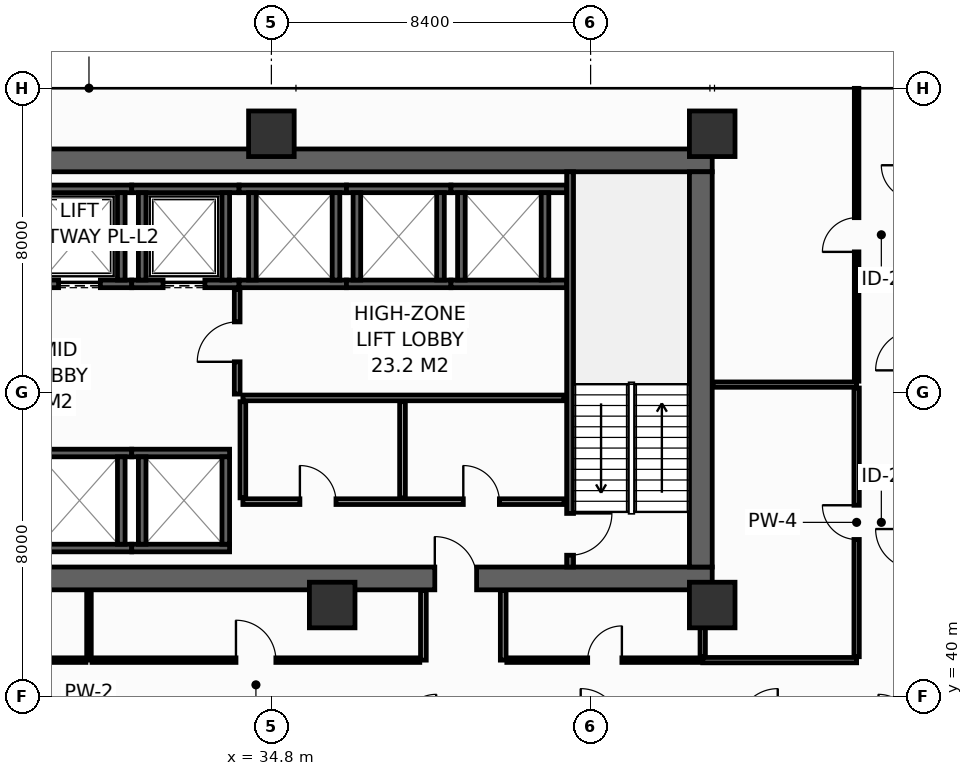
"""IFC4 building model, lengths in metres.
Left out: names, types, materials, properties, quantities, classifications, styles, units other than length and angle.
Written with IfcOpenShell. Run it as: python <this file> out.ifc"""

import sys

from ifc_helpers import new_model, si_unit, direction, frame, frame_2d, origin, origin_2d, place, context, subcontext, project, spatial, rectangle, hollow_rectangle, extrude, element, fill, save


model = new_model("IFC4")
c1 = context("Model", 3, precision=1e-05, world=origin(), true_north=direction((0.0, 1.0)))
c2 = subcontext(c1, "Body", "Model", "MODEL_VIEW")
j1 = project(units=[si_unit("LENGTHUNIT", "METRE"), si_unit("PLANEANGLEUNIT", "RADIAN")], contexts=[c1])
p1 = place(None, origin())
s1 = spatial("IfcSite", under=j1, at=p1, CompositionType="ELEMENT")
p2 = place(p1, origin())
s2 = spatial("IfcBuilding", under=s1, at=p2, CompositionType="ELEMENT")
p3 = place(p2, frame((0.0, 0.0, 92.8)))
s3 = spatial("IfcBuildingStorey", under=s2, at=p3, CompositionType="ELEMENT", Elevation=92.8)
p4 = place(p3, frame((13.5, 43.1, 0.0), z_axis=(0.0, 0.0, 1.0), x_axis=(1.0, 0.0, 0.0)))
e1 = element("IfcWall", 1, at=p4, inside=s3, PredefinedType="SHEAR", context=c2, shape_type="SweptSolid", body=[
    extrude(rectangle(XDim=32.9, YDim=0.6, at=frame_2d((16.45, 0.0))), origin(), (0.0, 0.0, 1.0), 4.15),
])
p5 = place(p4, frame((5.4, 0.0, 0.0)))
e2 = element("IfcOpeningElement", 2, at=p5, cuts=e1, PredefinedType="OPENING", context=c2, shape_type="SweptSolid", body=[
    extrude(rectangle(XDim=1.1, YDim=2.15, at=frame_2d((0.55, 1.075))), frame((0.0, 0.31, 0.0), z_axis=(0.0, -1.0, 0.0), x_axis=(1.0, 0.0, 0.0)), (0.0, 0.0, 1.0), 0.62),
])
p6 = place(p4, frame((25.6, 0.0, 0.0)))
e3 = element("IfcOpeningElement", 3, at=p6, cuts=e1, PredefinedType="OPENING", context=c2, shape_type="SweptSolid", body=[
    extrude(rectangle(XDim=1.1, YDim=2.15, at=frame_2d((0.55, 1.075))), frame((0.0, 0.31, 0.0), z_axis=(0.0, -1.0, 0.0), x_axis=(1.0, 0.0, 0.0)), (0.0, 0.0, 1.0), 0.62),
])
p7 = place(p3, frame((13.5, 54.1, 0.0), z_axis=(0.0, 0.0, 1.0), x_axis=(1.0, 0.0, 0.0)))
e4 = element("IfcWall", 4, at=p7, inside=s3, PredefinedType="SHEAR", context=c2, shape_type="SweptSolid", body=[
    extrude(rectangle(XDim=32.9, YDim=0.6, at=frame_2d((16.45, 0.0))), origin(), (0.0, 0.0, 1.0), 4.15),
])
p8 = place(p3, frame((46.1, 43.4, 0.0), z_axis=(0.0, 0.0, 1.0), x_axis=(0.0, 1.0, 0.0)))
e5 = element("IfcWall", 5, at=p8, inside=s3, PredefinedType="SHEAR", context=c2, shape_type="SweptSolid", body=[
    extrude(rectangle(XDim=10.4, YDim=0.6, at=frame_2d((5.2, 0.0))), origin(), (0.0, 0.0, 1.0), 4.15),
])
for number, where, z_axis, x_axis in (
    (6, (34.8, 54.8, 0.0), (0.0, 0.0, 1.0), (1.0, 0.0, 0.0)),
    (7, (46.4, 54.8, 0.0), (0.0, 0.0, 1.0), (1.0, 0.0, 0.0)),
    (8, (36.4, 42.4, 0.0), (0.0, 0.0, 1.0), (1.0, 0.0, 0.0)),
    (9, (46.4, 42.4, 0.0), (0.0, 0.0, 1.0), (1.0, 0.0, 0.0)),
):
    element("IfcColumn", number, at=place(p3, frame(where, z_axis=z_axis, x_axis=x_axis)), inside=s3, PredefinedType="COLUMN", context=c2, shape_type="SweptSolid", body=[
        extrude(hollow_rectangle(XDim=1.2, YDim=1.2, WallThickness=0.055, at=origin_2d()), origin(), (0.0, 0.0, 1.0), 4.4),
    ])
p9 = place(p3, frame((28.375, 50.85, 0.0), z_axis=(0.0, 0.0, 1.0), x_axis=(1.0, 0.0, 0.0)))
e10 = element("IfcWall", 10, at=p9, inside=s3, PredefinedType="SHEAR", context=c2, shape_type="SweptSolid", body=[
    extrude(rectangle(XDim=2.75, YDim=0.2, at=frame_2d((1.375, 0.0))), origin(), (0.0, 0.0, 1.0), 4.15),
])
p10 = place(p9, frame((0.825, 0.0, 0.0)))
e11 = element("IfcOpeningElement", 11, at=p10, cuts=e10, PredefinedType="OPENING", context=c2, shape_type="SweptSolid", body=[
    extrude(rectangle(XDim=1.1, YDim=2.2, at=frame_2d((0.55, 1.1))), frame((0.0, 0.11, 0.0), z_axis=(0.0, -1.0, 0.0), x_axis=(1.0, 0.0, 0.0)), (0.0, 0.0, 1.0), 0.22),
])
p11 = place(p3, frame((28.375, 53.35, 0.0), z_axis=(0.0, 0.0, 1.0), x_axis=(1.0, 0.0, 0.0)))
e12 = element("IfcWall", 12, at=p11, inside=s3, PredefinedType="SHEAR", context=c2, shape_type="SweptSolid", body=[
    extrude(rectangle(XDim=2.75, YDim=0.2, at=frame_2d((1.375, 0.0))), origin(), (0.0, 0.0, 1.0), 4.15),
])
p12 = place(p3, frame((30.85, 50.95, 0.0), z_axis=(0.0, 0.0, 1.0), x_axis=(0.0, 1.0, 0.0)))
e13 = element("IfcWall", 13, at=p12, inside=s3, PredefinedType="SHEAR", context=c2, shape_type="SweptSolid", body=[
    extrude(rectangle(XDim=2.3, YDim=0.2, at=frame_2d((1.15, 0.0))), origin(), (0.0, 0.0, 1.0), 4.15),
])
p13 = place(p3, frame((31.125, 50.85, 0.0), z_axis=(0.0, 0.0, 1.0), x_axis=(1.0, 0.0, 0.0)))
e14 = element("IfcWall", 14, at=p13, inside=s3, PredefinedType="SHEAR", context=c2, shape_type="SweptSolid", body=[
    extrude(rectangle(XDim=2.825, YDim=0.2, at=frame_2d((1.413, 0.0))), origin(), (0.0, 0.0, 1.0), 4.15),
])
p14 = place(p13, frame((0.825, 0.0, 0.0)))
e15 = element("IfcOpeningElement", 15, at=p14, cuts=e14, PredefinedType="OPENING", context=c2, shape_type="SweptSolid", body=[
    extrude(rectangle(XDim=1.1, YDim=2.2, at=frame_2d((0.55, 1.1))), frame((0.0, 0.11, 0.0), z_axis=(0.0, -1.0, 0.0), x_axis=(1.0, 0.0, 0.0)), (0.0, 0.0, 1.0), 0.22),
])
p15 = place(p3, frame((31.125, 53.35, 0.0), z_axis=(0.0, 0.0, 1.0), x_axis=(1.0, 0.0, 0.0)))
e16 = element("IfcWall", 16, at=p15, inside=s3, PredefinedType="SHEAR", context=c2, shape_type="SweptSolid", body=[
    extrude(rectangle(XDim=2.825, YDim=0.2, at=frame_2d((1.413, 0.0))), origin(), (0.0, 0.0, 1.0), 4.15),
])
for number, where, z_axis, x_axis in (
    (17, (31.4, 50.95, 0.0), (0.0, 0.0, 1.0), (0.0, 1.0, 0.0)),
    (18, (33.6, 50.95, 0.0), (0.0, 0.0, 1.0), (0.0, 1.0, 0.0)),
):
    element("IfcWall", number, at=place(p3, frame(where, z_axis=z_axis, x_axis=x_axis)), inside=s3, PredefinedType="SHEAR", context=c2, shape_type="SweptSolid", body=[
        extrude(rectangle(XDim=2.3, YDim=0.2, at=frame_2d((1.15, 0.0))), origin(), (0.0, 0.0, 1.0), 4.15),
    ])
for number, where, z_axis, x_axis in (
    (19, (28.375, 43.9, 0.0), (0.0, 0.0, 1.0), (1.0, 0.0, 0.0)),
    (20, (28.375, 46.4, 0.0), (0.0, 0.0, 1.0), (1.0, 0.0, 0.0)),
):
    element("IfcWall", number, at=place(p3, frame(where, z_axis=z_axis, x_axis=x_axis)), inside=s3, PredefinedType="SHEAR", context=c2, shape_type="SweptSolid", body=[
        extrude(rectangle(XDim=2.75, YDim=0.2, at=frame_2d((1.375, 0.0))), origin(), (0.0, 0.0, 1.0), 4.15),
    ])
p16 = place(p3, frame((30.85, 44.0, 0.0), z_axis=(0.0, 0.0, 1.0), x_axis=(0.0, 1.0, 0.0)))
e21 = element("IfcWall", 21, at=p16, inside=s3, PredefinedType="SHEAR", context=c2, shape_type="SweptSolid", body=[
    extrude(rectangle(XDim=2.3, YDim=0.2, at=frame_2d((1.15, 0.0))), origin(), (0.0, 0.0, 1.0), 4.15),
])
for number, where, z_axis, x_axis in (
    (22, (31.125, 43.9, 0.0), (0.0, 0.0, 1.0), (1.0, 0.0, 0.0)),
    (23, (31.125, 46.4, 0.0), (0.0, 0.0, 1.0), (1.0, 0.0, 0.0)),
):
    element("IfcWall", number, at=place(p3, frame(where, z_axis=z_axis, x_axis=x_axis)), inside=s3, PredefinedType="SHEAR", context=c2, shape_type="SweptSolid", body=[
        extrude(rectangle(XDim=2.575, YDim=0.2, at=frame_2d((1.288, 0.0))), origin(), (0.0, 0.0, 1.0), 4.15),
    ])
for number, where, z_axis, x_axis in (
    (24, (31.4, 44.0, 0.0), (0.0, 0.0, 1.0), (0.0, 1.0, 0.0)),
    (25, (33.6, 44.0, 0.0), (0.0, 0.0, 1.0), (0.0, 1.0, 0.0)),
):
    element("IfcWall", number, at=place(p3, frame(where, z_axis=z_axis, x_axis=x_axis)), inside=s3, PredefinedType="SHEAR", context=c2, shape_type="SweptSolid", body=[
        extrude(rectangle(XDim=2.3, YDim=0.2, at=frame_2d((1.15, 0.0))), origin(), (0.0, 0.0, 1.0), 4.15),
    ])
for number, where, z_axis, x_axis in (
    (26, (33.95, 50.85, 0.0), (0.0, 0.0, 1.0), (1.0, 0.0, 0.0)),
    (27, (33.95, 53.35, 0.0), (0.0, 0.0, 1.0), (1.0, 0.0, 0.0)),
):
    element("IfcWall", number, at=place(p3, frame(where, z_axis=z_axis, x_axis=x_axis)), inside=s3, PredefinedType="SHEAR", context=c2, shape_type="SweptSolid", body=[
        extrude(rectangle(XDim=2.825, YDim=0.2, at=frame_2d((1.413, 0.0))), origin(), (0.0, 0.0, 1.0), 4.15),
    ])
for number, where, z_axis, x_axis in (
    (28, (34.3, 50.95, 0.0), (0.0, 0.0, 1.0), (0.0, 1.0, 0.0)),
    (29, (36.5, 50.95, 0.0), (0.0, 0.0, 1.0), (0.0, 1.0, 0.0)),
):
    element("IfcWall", number, at=place(p3, frame(where, z_axis=z_axis, x_axis=x_axis)), inside=s3, PredefinedType="SHEAR", context=c2, shape_type="SweptSolid", body=[
        extrude(rectangle(XDim=2.3, YDim=0.2, at=frame_2d((1.15, 0.0))), origin(), (0.0, 0.0, 1.0), 4.15),
    ])
for number, where, z_axis, x_axis in (
    (30, (36.775, 50.85, 0.0), (0.0, 0.0, 1.0), (1.0, 0.0, 0.0)),
    (31, (36.775, 53.35, 0.0), (0.0, 0.0, 1.0), (1.0, 0.0, 0.0)),
):
    element("IfcWall", number, at=place(p3, frame(where, z_axis=z_axis, x_axis=x_axis)), inside=s3, PredefinedType="SHEAR", context=c2, shape_type="SweptSolid", body=[
        extrude(rectangle(XDim=2.75, YDim=0.2, at=frame_2d((1.375, 0.0))), origin(), (0.0, 0.0, 1.0), 4.15),
    ])
for number, where, z_axis, x_axis in (
    (32, (37.05, 50.95, 0.0), (0.0, 0.0, 1.0), (0.0, 1.0, 0.0)),
    (33, (39.25, 50.95, 0.0), (0.0, 0.0, 1.0), (0.0, 1.0, 0.0)),
):
    element("IfcWall", number, at=place(p3, frame(where, z_axis=z_axis, x_axis=x_axis)), inside=s3, PredefinedType="SHEAR", context=c2, shape_type="SweptSolid", body=[
        extrude(rectangle(XDim=2.3, YDim=0.2, at=frame_2d((1.15, 0.0))), origin(), (0.0, 0.0, 1.0), 4.15),
    ])
for number, where, z_axis, x_axis in (
    (34, (39.525, 50.85, 0.0), (0.0, 0.0, 1.0), (1.0, 0.0, 0.0)),
    (35, (39.525, 53.35, 0.0), (0.0, 0.0, 1.0), (1.0, 0.0, 0.0)),
):
    element("IfcWall", number, at=place(p3, frame(where, z_axis=z_axis, x_axis=x_axis)), inside=s3, PredefinedType="SHEAR", context=c2, shape_type="SweptSolid", body=[
        extrude(rectangle(XDim=3.045, YDim=0.2, at=frame_2d((1.522, 0.0))), origin(), (0.0, 0.0, 1.0), 4.15),
    ])
for number, where, z_axis, x_axis in (
    (36, (39.8, 50.95, 0.0), (0.0, 0.0, 1.0), (0.0, 1.0, 0.0)),
    (37, (42.0, 50.95, 0.0), (0.0, 0.0, 1.0), (0.0, 1.0, 0.0)),
):
    element("IfcWall", number, at=place(p3, frame(where, z_axis=z_axis, x_axis=x_axis)), inside=s3, PredefinedType="SHEAR", context=c2, shape_type="SweptSolid", body=[
        extrude(rectangle(XDim=2.3, YDim=0.2, at=frame_2d((1.15, 0.0))), origin(), (0.0, 0.0, 1.0), 4.15),
    ])
p17 = place(p3, frame((42.66, 53.8, 0.0), z_axis=(0.0, 0.0, 1.0), x_axis=(0.0, -1.0, 0.0)))
e38 = element("IfcWall", 38, at=p17, inside=s3, PredefinedType="SHEAR", context=c2, shape_type="SweptSolid", body=[
    extrude(rectangle(XDim=10.4, YDim=0.18, at=frame_2d((5.2, 0.0))), origin(), (0.0, 0.0, 1.0), 4.15),
])
p18 = place(p17, frame((8.99, 0.0, 0.0)))
e39 = element("IfcOpeningElement", 39, at=p18, cuts=e38, PredefinedType="OPENING", context=c2, shape_type="SweptSolid", body=[
    extrude(rectangle(XDim=1.1, YDim=2.15, at=frame_2d((0.55, 1.075))), frame((0.0, 0.1, 0.0), z_axis=(0.0, -1.0, 0.0), x_axis=(1.0, 0.0, 0.0)), (0.0, 0.0, 1.0), 0.2),
])
p19 = place(p3, frame((33.9, 47.95, 0.0), z_axis=(0.0, 0.0, 1.0), x_axis=(0.0, 1.0, 0.0)))
e40 = element("IfcWall", 40, at=p19, inside=s3, PredefinedType="PARTITIONING", context=c2, shape_type="SweptSolid", body=[
    extrude(rectangle(XDim=2.75, YDim=0.15, at=frame_2d((1.375, 0.0))), origin(), (0.0, 0.0, 1.0), 4.15),
])
p20 = place(p19, frame((0.85, 0.0, 0.0)))
e41 = element("IfcOpeningElement", 41, at=p20, cuts=e40, PredefinedType="OPENING", context=c2, shape_type="SweptSolid", body=[
    extrude(rectangle(XDim=1.05, YDim=2.15, at=frame_2d((0.525, 1.075))), frame((0.0, 0.085, 0.0), z_axis=(0.0, -1.0, 0.0), x_axis=(1.0, 0.0, 0.0)), (0.0, 0.0, 1.0), 0.17),
])
p21 = place(p3, frame((34.05, 45.12, 0.0), z_axis=(0.0, 0.0, 1.0), x_axis=(1.0, 0.0, 0.0)))
e42 = element("IfcWall", 42, at=p21, inside=s3, PredefinedType="PARTITIONING", context=c2, shape_type="SweptSolid", body=[
    extrude(rectangle(XDim=8.45, YDim=0.15, at=frame_2d((4.225, 0.0))), origin(), (0.0, 0.0, 1.0), 4.15),
])
p22 = place(p21, frame((1.5, 0.0, 0.0)))
e43 = element("IfcOpeningElement", 43, at=p22, cuts=e42, PredefinedType="OPENING", context=c2, shape_type="SweptSolid", body=[
    extrude(rectangle(XDim=0.95, YDim=2.15, at=frame_2d((0.475, 1.075))), frame((0.0, 0.085, 0.0), z_axis=(0.0, -1.0, 0.0), x_axis=(1.0, 0.0, 0.0)), (0.0, 0.0, 1.0), 0.17),
])
p23 = place(p21, frame((5.8, 0.0, 0.0)))
e44 = element("IfcOpeningElement", 44, at=p23, cuts=e42, PredefinedType="OPENING", context=c2, shape_type="SweptSolid", body=[
    extrude(rectangle(XDim=0.95, YDim=2.15, at=frame_2d((0.475, 1.075))), frame((0.0, 0.085, 0.0), z_axis=(0.0, -1.0, 0.0), x_axis=(1.0, 0.0, 0.0)), (0.0, 0.0, 1.0), 0.17),
])
p24 = place(p3, frame((34.05, 47.85, 0.0), z_axis=(0.0, 0.0, 1.0), x_axis=(1.0, 0.0, 0.0)))
e45 = element("IfcWall", 45, at=p24, inside=s3, PredefinedType="PARTITIONING", context=c2, shape_type="SweptSolid", body=[
    extrude(rectangle(XDim=8.45, YDim=0.15, at=frame_2d((4.225, 0.0))), origin(), (0.0, 0.0, 1.0), 4.15),
])
for number, where, z_axis, x_axis in (
    (46, (38.25, 45.22, 0.0), (0.0, 0.0, 1.0), (0.0, 1.0, 0.0)),
    (47, (34.05, 45.22, 0.0), (0.0, 0.0, 1.0), (0.0, 1.0, 0.0)),
):
    element("IfcWall", number, at=place(p3, frame(where, z_axis=z_axis, x_axis=x_axis)), inside=s3, PredefinedType="PARTITIONING", context=c2, shape_type="SweptSolid", body=[
        extrude(rectangle(XDim=2.53, YDim=0.15, at=frame_2d((1.265, 0.0))), origin(), (0.0, 0.0, 1.0), 4.15),
    ])
p25 = place(p3, frame((46.15, 40.95, 0.0), z_axis=(0.0, 0.0, 1.0), x_axis=(1.0, 0.0, 0.0)))
e48 = element("IfcWall", 48, at=p25, inside=s3, PredefinedType="PARTITIONING", context=c2, shape_type="SweptSolid", body=[
    extrude(rectangle(XDim=4.05, YDim=0.14, at=frame_2d((2.025, 0.0))), origin(), (0.0, 0.0, 1.0), 4.15),
])
p26 = place(p3, frame((46.15, 41.04, 0.0), z_axis=(0.0, 0.0, 1.0), x_axis=(0.0, 1.0, 0.0)))
e49 = element("IfcWall", 49, at=p26, inside=s3, PredefinedType="PARTITIONING", context=c2, shape_type="SweptSolid", body=[
    extrude(rectangle(XDim=1.74, YDim=0.14, at=frame_2d((0.87, 0.0))), origin(), (0.0, 0.0, 1.0), 4.15),
])
p27 = place(p3, frame((46.42, 48.2, 0.0), z_axis=(0.0, 0.0, 1.0), x_axis=(1.0, 0.0, 0.0)))
e50 = element("IfcWall", 50, at=p27, inside=s3, PredefinedType="PARTITIONING", context=c2, shape_type="SweptSolid", body=[
    extrude(rectangle(XDim=3.78, YDim=0.14, at=frame_2d((1.89, 0.0))), origin(), (0.0, 0.0, 1.0), 4.15),
])
p28 = place(p3, frame((50.2, 41.04, 0.0), z_axis=(0.0, 0.0, 1.0), x_axis=(0.0, 1.0, 0.0)))
e51 = element("IfcWall", 51, at=p28, inside=s3, PredefinedType="PARTITIONING", context=c2, shape_type="SweptSolid", body=[
    extrude(rectangle(XDim=7.07, YDim=0.14, at=frame_2d((3.535, 0.0))), origin(), (0.0, 0.0, 1.0), 3.335),
])
p29 = place(p28, frame((3.085, 0.0, 0.0)))
e52 = element("IfcOpeningElement", 52, at=p29, cuts=e51, PredefinedType="OPENING", context=c2, shape_type="SweptSolid", body=[
    extrude(rectangle(XDim=0.9, YDim=2.1, at=frame_2d((0.45, 1.05))), frame((0.0, 0.08, 0.0), z_axis=(0.0, -1.0, 0.0), x_axis=(1.0, 0.0, 0.0)), (0.0, 0.0, 1.0), 0.16),
])
p30 = place(p3, frame((50.2, 48.29, 0.0), z_axis=(0.0, 0.0, 1.0), x_axis=(0.0, 1.0, 0.0)))
e53 = element("IfcWall", 53, at=p30, inside=s3, PredefinedType="PARTITIONING", context=c2, shape_type="SweptSolid", body=[
    extrude(rectangle(XDim=7.705, YDim=0.12, at=frame_2d((3.853, 0.0))), origin(), (0.0, 0.0, 1.0), 3.435),
])
p31 = place(p30, frame((3.402, 0.0, 0.0)))
e54 = element("IfcOpeningElement", 54, at=p31, cuts=e53, PredefinedType="OPENING", context=c2, shape_type="SweptSolid", body=[
    extrude(rectangle(XDim=0.9, YDim=2.1, at=frame_2d((0.45, 1.05))), frame((0.0, 0.07, 0.0), z_axis=(0.0, -1.0, 0.0), x_axis=(1.0, 0.0, 0.0)), (0.0, 0.0, 1.0), 0.14),
])
for number, where, z_axis, x_axis in (
    (55, (38.8, 40.95, 0.0), (0.0, 0.0, 1.0), (0.0, 1.0, 0.0)),
    (56, (40.9, 40.95, 0.0), (0.0, 0.0, 1.0), (0.0, 1.0, 0.0)),
):
    element("IfcWall", number, at=place(p3, frame(where, z_axis=z_axis, x_axis=x_axis)), inside=s3, PredefinedType="PARTITIONING", context=c2, shape_type="SweptSolid", body=[
        extrude(rectangle(XDim=1.83, YDim=0.15, at=frame_2d((0.915, 0.0))), origin(), (0.0, 0.0, 1.0), 4.15),
    ])
p32 = place(p3, frame((30.0, 40.95, 0.0), z_axis=(0.0, 0.0, 1.0), x_axis=(0.0, 1.0, 0.0)))
e57 = element("IfcWall", 57, at=p32, inside=s3, PredefinedType="PARTITIONING", context=c2, shape_type="SweptSolid", body=[
    extrude(rectangle(XDim=1.83, YDim=0.12, at=frame_2d((0.915, 0.0))), origin(), (0.0, 0.0, 1.0), 3.335),
])
p33 = place(p3, frame((20.795, 40.95, 0.0), z_axis=(0.0, 0.0, 1.0), x_axis=(1.0, 0.0, 0.0)))
e58 = element("IfcWall", 58, at=p33, inside=s3, PredefinedType="PARTITIONING", context=c2, shape_type="SweptSolid", body=[
    extrude(rectangle(XDim=9.125, YDim=0.12, at=frame_2d((4.562, 0.0))), origin(), (0.0, 0.0, 1.0), 3.335),
])
p34 = place(p33, frame((4.112, 0.0, 0.0)))
e59 = element("IfcOpeningElement", 59, at=p34, cuts=e58, PredefinedType="OPENING", context=c2, shape_type="SweptSolid", body=[
    extrude(rectangle(XDim=0.9, YDim=2.1, at=frame_2d((0.45, 1.05))), frame((0.0, 0.07, 0.0), z_axis=(0.0, -1.0, 0.0), x_axis=(1.0, 0.0, 0.0)), (0.0, 0.0, 1.0), 0.14),
])
p35 = place(p3, frame((30.08, 40.95, 0.0), z_axis=(0.0, 0.0, 1.0), x_axis=(1.0, 0.0, 0.0)))
e60 = element("IfcWall", 60, at=p35, inside=s3, PredefinedType="PARTITIONING", context=c2, shape_type="SweptSolid", body=[
    extrude(rectangle(XDim=8.625, YDim=0.12, at=frame_2d((4.312, 0.0))), origin(), (0.0, 0.0, 1.0), 3.335),
])
p36 = place(p35, frame((3.788, 0.0, 0.0)))
e61 = element("IfcOpeningElement", 61, at=p36, cuts=e60, PredefinedType="OPENING", context=c2, shape_type="SweptSolid", body=[
    extrude(rectangle(XDim=1.05, YDim=2.15, at=frame_2d((0.525, 1.075))), frame((0.0, 0.07, 0.0), z_axis=(0.0, -1.0, 0.0), x_axis=(1.0, 0.0, 0.0)), (0.0, 0.0, 1.0), 0.14),
])
p37 = place(p3, frame((40.995, 40.95, 0.0), z_axis=(0.0, 0.0, 1.0), x_axis=(1.0, 0.0, 0.0)))
e62 = element("IfcWall", 62, at=p37, inside=s3, PredefinedType="PARTITIONING", context=c2, shape_type="SweptSolid", body=[
    extrude(rectangle(XDim=5.155, YDim=0.12, at=frame_2d((2.577, 0.0))), origin(), (0.0, 0.0, 1.0), 4.15),
])
p38 = place(p37, frame((2.128, 0.0, 0.0)))
e63 = element("IfcOpeningElement", 63, at=p38, cuts=e62, PredefinedType="OPENING", context=c2, shape_type="SweptSolid", body=[
    extrude(rectangle(XDim=0.9, YDim=2.1, at=frame_2d((0.45, 1.05))), frame((0.0, 0.07, 0.0), z_axis=(0.0, -1.0, 0.0), x_axis=(1.0, 0.0, 0.0)), (0.0, 0.0, 1.0), 0.14),
])
p39 = place(p10, origin())
e64 = element("IfcDoor", 64, at=p39, inside=s3, OperationType="SLIDING_TO_LEFT", PredefinedType="DOOR", context=c2, shape_type="SweptSolid", body=[
    extrude(rectangle(XDim=1.1, YDim=2.2, at=frame_2d((0.55, 1.1))), frame((0.0, 0.025, 0.0), z_axis=(0.0, -1.0, 0.0), x_axis=(1.0, 0.0, 0.0)), (0.0, 0.0, 1.0), 0.05),
])
fill(e11, e64)
p40 = place(p14, origin())
e65 = element("IfcDoor", 65, at=p40, inside=s3, OperationType="SLIDING_TO_LEFT", PredefinedType="DOOR", context=c2, shape_type="SweptSolid", body=[
    extrude(rectangle(XDim=1.1, YDim=2.2, at=frame_2d((0.55, 1.1))), frame((0.0, 0.025, 0.0), z_axis=(0.0, -1.0, 0.0), x_axis=(1.0, 0.0, 0.0)), (0.0, 0.0, 1.0), 0.05),
])
fill(e15, e65)
p41 = place(p18, origin())
e66 = element("IfcDoor", 66, at=p41, inside=s3, OperationType="SINGLE_SWING_LEFT", PredefinedType="DOOR", context=c2, shape_type="SweptSolid", body=[
    extrude(rectangle(XDim=1.1, YDim=2.15, at=frame_2d((0.55, 1.075))), frame((0.0, 0.025, 0.0), z_axis=(0.0, -1.0, 0.0), x_axis=(1.0, 0.0, 0.0)), (0.0, 0.0, 1.0), 0.05),
])
fill(e39, e66)
p42 = place(p6, origin())
e67 = element("IfcDoor", 67, at=p42, inside=s3, OperationType="SINGLE_SWING_LEFT", PredefinedType="DOOR", context=c2, shape_type="SweptSolid", body=[
    extrude(rectangle(XDim=1.1, YDim=2.15, at=frame_2d((0.55, 1.075))), frame((0.0, 0.025, 0.0), z_axis=(0.0, -1.0, 0.0), x_axis=(1.0, 0.0, 0.0)), (0.0, 0.0, 1.0), 0.05),
])
fill(e3, e67)
p43 = place(p20, origin())
e68 = element("IfcDoor", 68, at=p43, inside=s3, OperationType="SINGLE_SWING_LEFT", PredefinedType="DOOR", context=c2, shape_type="SweptSolid", body=[
    extrude(rectangle(XDim=1.05, YDim=2.15, at=frame_2d((0.525, 1.075))), frame((0.0, 0.025, 0.0), z_axis=(0.0, -1.0, 0.0), x_axis=(1.0, 0.0, 0.0)), (0.0, 0.0, 1.0), 0.05),
])
fill(e41, e68)
p44 = place(p22, origin())
e69 = element("IfcDoor", 69, at=p44, inside=s3, OperationType="SINGLE_SWING_LEFT", PredefinedType="DOOR", context=c2, shape_type="SweptSolid", body=[
    extrude(rectangle(XDim=0.95, YDim=2.15, at=frame_2d((0.475, 1.075))), frame((0.0, 0.025, 0.0), z_axis=(0.0, -1.0, 0.0), x_axis=(1.0, 0.0, 0.0)), (0.0, 0.0, 1.0), 0.05),
])
fill(e43, e69)
p45 = place(p23, origin())
e70 = element("IfcDoor", 70, at=p45, inside=s3, OperationType="SINGLE_SWING_LEFT", PredefinedType="DOOR", context=c2, shape_type="SweptSolid", body=[
    extrude(rectangle(XDim=0.95, YDim=2.15, at=frame_2d((0.475, 1.075))), frame((0.0, 0.025, 0.0), z_axis=(0.0, -1.0, 0.0), x_axis=(1.0, 0.0, 0.0)), (0.0, 0.0, 1.0), 0.05),
])
fill(e44, e70)
p46 = place(p29, origin())
e71 = element("IfcDoor", 71, at=p46, inside=s3, OperationType="SINGLE_SWING_RIGHT", PredefinedType="DOOR", context=c2, shape_type="SweptSolid", body=[
    extrude(rectangle(XDim=0.9, YDim=2.1, at=frame_2d((0.45, 1.05))), frame((0.0, 0.025, 0.0), z_axis=(0.0, -1.0, 0.0), x_axis=(1.0, 0.0, 0.0)), (0.0, 0.0, 1.0), 0.05),
])
fill(e52, e71)
p47 = place(p31, origin())
e72 = element("IfcDoor", 72, at=p47, inside=s3, OperationType="SINGLE_SWING_LEFT", PredefinedType="DOOR", context=c2, shape_type="SweptSolid", body=[
    extrude(rectangle(XDim=0.9, YDim=2.1, at=frame_2d((0.45, 1.05))), frame((0.0, 0.025, 0.0), z_axis=(0.0, -1.0, 0.0), x_axis=(1.0, 0.0, 0.0)), (0.0, 0.0, 1.0), 0.05),
])
fill(e54, e72)
p48 = place(p36, origin())
e73 = element("IfcDoor", 73, at=p48, inside=s3, OperationType="SINGLE_SWING_LEFT", PredefinedType="DOOR", context=c2, shape_type="SweptSolid", body=[
    extrude(rectangle(XDim=1.05, YDim=2.15, at=frame_2d((0.525, 1.075))), frame((0.0, 0.025, 0.0), z_axis=(0.0, -1.0, 0.0), x_axis=(1.0, 0.0, 0.0)), (0.0, 0.0, 1.0), 0.05),
])
fill(e61, e73)
p49 = place(p38, origin())
e74 = element("IfcDoor", 74, at=p49, inside=s3, OperationType="SINGLE_SWING_RIGHT", PredefinedType="DOOR", context=c2, shape_type="SweptSolid", body=[
    extrude(rectangle(XDim=0.9, YDim=2.1, at=frame_2d((0.45, 1.05))), frame((0.0, 0.025, 0.0), z_axis=(0.0, -1.0, 0.0), x_axis=(1.0, 0.0, 0.0)), (0.0, 0.0, 1.0), 0.05),
])
fill(e63, e74)
save(model, sys.argv[1])
